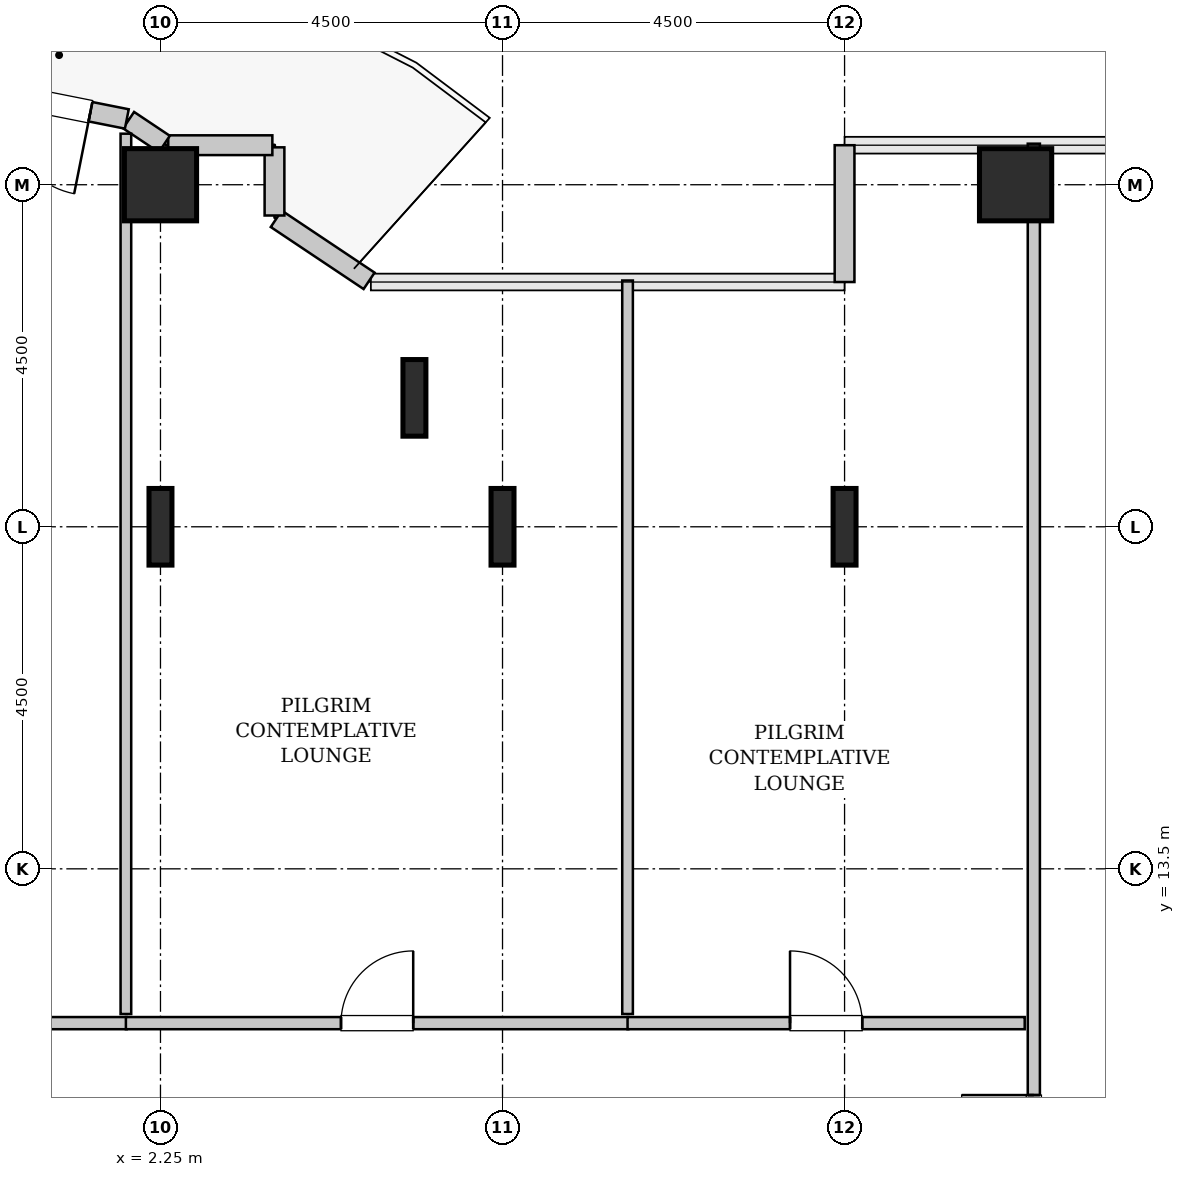
"""IFC4 building model, lengths in metres.
Left out: names, types, materials, properties, quantities, classifications, styles, units other than length and angle.
Written with IfcOpenShell. Run it as: python <this file> out.ifc"""

import sys

from ifc_helpers import new_model, si_unit, direction, frame, frame_2d, origin, origin_2d, place, context, subcontext, project, spatial, rectangle, hollow_rectangle, i_section, extrude, source, transform, mapped, element, fill, save


model = new_model("IFC4")
c1 = context("Model", 3, precision=1e-05, world=origin(), true_north=direction((0.0, 1.0)))
c2 = subcontext(c1, "Body", "Model", "MODEL_VIEW")
j1 = project(units=[si_unit("LENGTHUNIT", "METRE"), si_unit("PLANEANGLEUNIT", "RADIAN")], contexts=[c1])
p1 = place(None, origin())
s1 = spatial("IfcSite", under=j1, at=p1, CompositionType="ELEMENT")
p2 = place(p1, origin())
s2 = spatial("IfcBuilding", under=s1, at=p2, CompositionType="ELEMENT")
p3 = place(p2, frame((0.0, 0.0, 67.2)))
s3 = spatial("IfcBuildingStorey", under=s2, at=p3, CompositionType="ELEMENT", Elevation=67.2)
m1 = source(origin(), c2, "Body", "SweptSolid", [
    extrude(i_section(OverallWidth=0.302, OverallDepth=1.008, WebThickness=0.021, FlangeThickness=0.04, FilletRadius=0.03, at=origin_2d()), origin(), (0.0, 0.0, 1.0), 3.8),
])
p4 = place(p3, frame((2.25, 18.0, 0.0), z_axis=(0.0, 0.0, 1.0), x_axis=(1.0, 0.0, 0.0)))
e1 = element("IfcColumn", 1, at=p4, inside=s3, PredefinedType="COLUMN", context=c2, shape_type="MappedRepresentation", body=[
    mapped(m1, transform((0.0, 0.0, 0.0), x_axis=(1.0, 0.0, 0.0), y_axis=(0.0, 1.0, 0.0), z_axis=(0.0, 0.0, 1.0), scale=1.0)),
])
m2 = source(origin(), c2, "Body", "SweptSolid", [
    extrude(hollow_rectangle(XDim=0.95, YDim=0.95, WallThickness=0.045, InnerFilletRadius=0.045, OuterFilletRadius=0.09, at=origin_2d()), origin(), (0.0, 0.0, 1.0), 3.8),
])
p5 = place(p3, frame((2.25, 22.5, 0.0), z_axis=(0.0, 0.0, 1.0), x_axis=(1.0, 0.0, 0.0)))
e2 = element("IfcColumn", 2, at=p5, inside=s3, PredefinedType="COLUMN", context=c2, shape_type="MappedRepresentation", body=[
    mapped(m2, transform((0.0, 0.0, 0.0), x_axis=(1.0, 0.0, 0.0), y_axis=(0.0, 1.0, 0.0), z_axis=(0.0, 0.0, 1.0), scale=1.0)),
])
for number, where, z_axis, x_axis in (
    (3, (5.591, 19.696, 0.0), (0.0, 0.0, 1.0), (1.0, 0.0, 0.0)),
    (4, (6.75, 18.0, 0.0), (0.0, 0.0, 1.0), (1.0, 0.0, 0.0)),
    (5, (11.25, 18.0, 0.0), (0.0, 0.0, 1.0), (1.0, 0.0, 0.0)),
):
    element("IfcColumn", number, at=place(p3, frame(where, z_axis=z_axis, x_axis=x_axis)), inside=s3, PredefinedType="COLUMN", context=c2, shape_type="MappedRepresentation", body=[
        mapped(m1, transform((0.0, 0.0, 0.0), x_axis=(1.0, 0.0, 0.0), y_axis=(0.0, 1.0, 0.0), z_axis=(0.0, 0.0, 1.0), scale=1.0)),
    ])
p6 = place(p3, frame((13.5, 22.5, 0.0), z_axis=(0.0, 0.0, 1.0), x_axis=(1.0, 0.0, 0.0)))
e6 = element("IfcColumn", 6, at=p6, inside=s3, PredefinedType="COLUMN", context=c2, shape_type="MappedRepresentation", body=[
    mapped(m2, transform((0.0, 0.0, 0.0), x_axis=(1.0, 0.0, 0.0), y_axis=(0.0, 1.0, 0.0), z_axis=(0.0, 0.0, 1.0), scale=1.0)),
])
m3 = source(origin(), c2, "Body", "SweptSolid", [
    extrude(rectangle(XDim=1.8, YDim=0.26, at=frame_2d((0.9, 0.0))), origin(), (0.0, 0.0, 1.0), 3.55),
])
p7 = place(p3, frame((11.25, 23.02, 0.0), z_axis=(0.0, 0.0, 1.0), x_axis=(0.0, -1.0, 0.0)))
e7 = element("IfcWall", 7, at=p7, inside=s3, PredefinedType="SOLIDWALL", context=c2, shape_type="MappedRepresentation", body=[
    mapped(m3, transform((0.0, 0.0, 0.0), x_axis=(1.0, 0.0, 0.0), y_axis=(0.0, 1.0, 0.0), z_axis=(0.0, 0.0, 1.0), scale=1.0)),
])
m4 = source(origin(), c2, "Body", "SweptSolid", [
    extrude(rectangle(XDim=1.469, YDim=0.26, at=frame_2d((0.734, 0.0))), origin(), (0.0, 0.0, 1.0), 3.55),
])
p8 = place(p3, frame((4.995, 21.236, 0.0), z_axis=(0.0, 0.0, 1.0), x_axis=(-0.831461760506, 0.555581983884, 0.0)))
e8 = element("IfcWall", 8, at=p8, inside=s3, PredefinedType="SOLIDWALL", context=c2, shape_type="MappedRepresentation", body=[
    mapped(m4, transform((0.0, 0.0, 0.0), x_axis=(1.0, 0.0, 0.0), y_axis=(0.0, 1.0, 0.0), z_axis=(0.0, 0.0, 1.0), scale=1.0)),
])
m5 = source(origin(), c2, "Body", "SweptSolid", [
    extrude(rectangle(XDim=0.897, YDim=0.26, at=frame_2d((0.448, 0.0))), origin(), (0.0, 0.0, 1.0), 3.55),
])
p9 = place(p3, frame((3.75, 22.095, 0.0), z_axis=(0.0, 0.0, 1.0), x_axis=(0.0, 1.0, 0.0)))
e9 = element("IfcWall", 9, at=p9, inside=s3, PredefinedType="SOLIDWALL", context=c2, shape_type="MappedRepresentation", body=[
    mapped(m5, transform((0.0, 0.0, 0.0), x_axis=(1.0, 0.0, 0.0), y_axis=(0.0, 1.0, 0.0), z_axis=(0.0, 0.0, 1.0), scale=1.0)),
])
m6 = source(origin(), c2, "Body", "SweptSolid", [
    extrude(rectangle(XDim=1.37, YDim=0.26, at=frame_2d((0.685, 0.0))), origin(), (0.0, 0.0, 1.0), 3.55),
])
p10 = place(p3, frame((3.722, 23.02, 0.0), z_axis=(0.0, 0.0, 1.0), x_axis=(-1.0, 0.0, 0.0)))
e10 = element("IfcWall", 10, at=p10, inside=s3, PredefinedType="SOLIDWALL", context=c2, shape_type="MappedRepresentation", body=[
    mapped(m6, transform((0.0, 0.0, 0.0), x_axis=(1.0, 0.0, 0.0), y_axis=(0.0, 1.0, 0.0), z_axis=(0.0, 0.0, 1.0), scale=1.0)),
])
m7 = source(origin(), c2, "Body", "SweptSolid", [
    extrude(rectangle(XDim=0.565, YDim=0.26, at=frame_2d((0.283, 0.0))), origin(), (0.0, 0.0, 1.0), 3.55),
])
p11 = place(p3, frame((2.301, 23.036, 0.0), z_axis=(0.0, 0.0, 1.0), x_axis=(-0.831651492666, 0.555297933317, 0.0)))
e11 = element("IfcWall", 11, at=p11, inside=s3, PredefinedType="SOLIDWALL", context=c2, shape_type="MappedRepresentation", body=[
    mapped(m7, transform((0.0, 0.0, 0.0), x_axis=(1.0, 0.0, 0.0), y_axis=(0.0, 1.0, 0.0), z_axis=(0.0, 0.0, 1.0), scale=1.0)),
])
m8 = source(origin(), c2, "Body", "SweptSolid", [
    extrude(rectangle(XDim=4.137, YDim=0.26, at=frame_2d((2.068, 0.0))), origin(), (0.0, 0.0, 1.0), 3.55),
])
p12 = place(p3, frame((1.807, 23.365, 0.0), z_axis=(0.0, 0.0, 1.0), x_axis=(-0.980782170794, 0.195105954428, 0.0)))
e12 = element("IfcWall", 12, at=p12, inside=s3, PredefinedType="SOLIDWALL", context=c2, shape_type="MappedRepresentation", body=[
    mapped(m8, transform((0.0, 0.0, 0.0), x_axis=(1.0, 0.0, 0.0), y_axis=(0.0, 1.0, 0.0), z_axis=(0.0, 0.0, 1.0), scale=1.0)),
])
p13 = place(p12, frame((0.488, 0.0, 0.0)))
e13 = element("IfcOpeningElement", 13, at=p13, cuts=e12, PredefinedType="OPENING", context=c2, shape_type="SweptSolid", body=[
    extrude(rectangle(XDim=1.1, YDim=2.2, at=frame_2d((0.55, 1.1))), frame((0.0, 0.14, 0.0), z_axis=(0.0, -1.0, 0.0), x_axis=(1.0, 0.0, 0.0)), (0.0, 0.0, 1.0), 0.28),
])
m9 = source(origin(), c2, "Body", "SweptSolid", [
    extrude(rectangle(XDim=14.453, YDim=0.16, at=frame_2d((7.226, 0.0))), origin(), (0.0, 0.0, 1.0), 3.535),
])
p14 = place(p3, frame((13.74, 8.587, 0.0), z_axis=(0.0, 0.0, 1.0), x_axis=(0.0, 1.0, 0.0)))
e14 = element("IfcWall", 14, at=p14, inside=s3, PredefinedType="PARTITIONING", context=c2, shape_type="MappedRepresentation", body=[
    mapped(m9, transform((0.0, 0.0, 0.0), x_axis=(1.0, 0.0, 0.0), y_axis=(0.0, 1.0, 0.0), z_axis=(0.0, 0.0, 1.0), scale=1.0)),
])
p15 = place(p14, frame((0.986, 0.0, 0.0)))
e15 = element("IfcOpeningElement", 15, at=p15, cuts=e14, PredefinedType="OPENING", context=c2, shape_type="SweptSolid", body=[
    extrude(rectangle(XDim=0.95, YDim=2.1, at=frame_2d((0.475, 1.05))), frame((0.0, 0.09, 0.0), z_axis=(0.0, -1.0, 0.0), x_axis=(1.0, 0.0, 0.0)), (0.0, 0.0, 1.0), 0.18),
])
m10 = source(origin(), c2, "Body", "SweptSolid", [
    extrude(rectangle(XDim=4.605, YDim=0.16, at=frame_2d((2.302, 0.0))), origin(), (0.0, 0.0, 1.0), 3.535),
])
p16 = place(p3, frame((-2.8, 11.47, 0.0), z_axis=(0.0, 0.0, 1.0), x_axis=(1.0, 0.0, 0.0)))
e16 = element("IfcWall", 16, at=p16, inside=s3, PredefinedType="PARTITIONING", context=c2, shape_type="MappedRepresentation", body=[
    mapped(m10, transform((0.0, 0.0, 0.0), x_axis=(1.0, 0.0, 0.0), y_axis=(0.0, 1.0, 0.0), z_axis=(0.0, 0.0, 1.0), scale=1.0)),
])
p17 = place(p16, frame((1.827, 0.0, 0.0)))
e17 = element("IfcOpeningElement", 17, at=p17, cuts=e16, PredefinedType="OPENING", context=c2, shape_type="SweptSolid", body=[
    extrude(rectangle(XDim=0.95, YDim=2.1, at=frame_2d((0.475, 1.05))), frame((0.0, 0.09, 0.0), z_axis=(0.0, -1.0, 0.0), x_axis=(1.0, 0.0, 0.0)), (0.0, 0.0, 1.0), 0.18),
])
m11 = source(origin(), c2, "Body", "SweptSolid", [
    extrude(rectangle(XDim=11.581, YDim=0.14, at=frame_2d((5.791, 0.0))), origin(), (0.0, 0.0, 1.0), 2.825),
])
p18 = place(p3, frame((1.795, 11.59, 0.0), z_axis=(0.0, 0.0, 1.0), x_axis=(0.0, 1.0, 0.0)))
e18 = element("IfcWall", 18, at=p18, inside=s3, PredefinedType="PARTITIONING", context=c2, shape_type="MappedRepresentation", body=[
    mapped(m11, transform((0.0, 0.0, 0.0), x_axis=(1.0, 0.0, 0.0), y_axis=(0.0, 1.0, 0.0), z_axis=(0.0, 0.0, 1.0), scale=1.0)),
])
m12 = source(origin(), c2, "Body", "SweptSolid", [
    extrude(rectangle(XDim=6.61, YDim=0.16, at=frame_2d((3.305, 0.0))), origin(), (0.0, 0.0, 1.0), 3.535),
])
p19 = place(p3, frame((1.795, 11.47, 0.0), z_axis=(0.0, 0.0, 1.0), x_axis=(1.0, 0.0, 0.0)))
e19 = element("IfcWall", 19, at=p19, inside=s3, PredefinedType="PARTITIONING", context=c2, shape_type="MappedRepresentation", body=[
    mapped(m12, transform((0.0, 0.0, 0.0), x_axis=(1.0, 0.0, 0.0), y_axis=(0.0, 1.0, 0.0), z_axis=(0.0, 0.0, 1.0), scale=1.0)),
])
p20 = place(p19, frame((2.83, 0.0, 0.0)))
e20 = element("IfcOpeningElement", 20, at=p20, cuts=e19, PredefinedType="OPENING", context=c2, shape_type="SweptSolid", body=[
    extrude(rectangle(XDim=0.95, YDim=2.1, at=frame_2d((0.475, 1.05))), frame((0.0, 0.09, 0.0), z_axis=(0.0, -1.0, 0.0), x_axis=(1.0, 0.0, 0.0)), (0.0, 0.0, 1.0), 0.18),
])
m13 = source(origin(), c2, "Body", "SweptSolid", [
    extrude(rectangle(XDim=9.65, YDim=0.14, at=frame_2d((4.825, 0.0))), origin(), (0.0, 0.0, 1.0), 3.535),
])
p21 = place(p3, frame((8.395, 11.59, 0.0), z_axis=(0.0, 0.0, 1.0), x_axis=(0.0, 1.0, 0.0)))
e21 = element("IfcWall", 21, at=p21, inside=s3, PredefinedType="PARTITIONING", context=c2, shape_type="MappedRepresentation", body=[
    mapped(m13, transform((0.0, 0.0, 0.0), x_axis=(1.0, 0.0, 0.0), y_axis=(0.0, 1.0, 0.0), z_axis=(0.0, 0.0, 1.0), scale=1.0)),
])
m14 = source(origin(), c2, "Body", "SweptSolid", [
    extrude(rectangle(XDim=5.225, YDim=0.16, at=frame_2d((2.613, 0.0))), origin(), (0.0, 0.0, 1.0), 3.535),
])
p22 = place(p3, frame((8.395, 11.47, 0.0), z_axis=(0.0, 0.0, 1.0), x_axis=(1.0, 0.0, 0.0)))
e22 = element("IfcWall", 22, at=p22, inside=s3, PredefinedType="PARTITIONING", context=c2, shape_type="MappedRepresentation", body=[
    mapped(m14, transform((0.0, 0.0, 0.0), x_axis=(1.0, 0.0, 0.0), y_axis=(0.0, 1.0, 0.0), z_axis=(0.0, 0.0, 1.0), scale=1.0)),
])
p23 = place(p22, frame((2.137, 0.0, 0.0)))
e23 = element("IfcOpeningElement", 23, at=p23, cuts=e22, PredefinedType="OPENING", context=c2, shape_type="SweptSolid", body=[
    extrude(rectangle(XDim=0.95, YDim=2.1, at=frame_2d((0.475, 1.05))), frame((0.0, 0.09, 0.0), z_axis=(0.0, -1.0, 0.0), x_axis=(1.0, 0.0, 0.0)), (0.0, 0.0, 1.0), 0.18),
])
m15 = source(origin(), c2, "Body", "SweptSolid", [
    extrude(rectangle(XDim=1.1, YDim=2.2, at=frame_2d((0.55, 1.1))), frame((0.0, 0.025, 0.0), z_axis=(0.0, -1.0, 0.0), x_axis=(1.0, 0.0, 0.0)), (0.0, 0.0, 1.0), 0.05),
])
p24 = place(p13, origin())
e24 = element("IfcDoor", 24, at=p24, inside=s3, OperationType="SINGLE_SWING_LEFT", PredefinedType="DOOR", context=c2, shape_type="MappedRepresentation", body=[
    mapped(m15, transform((0.0, 0.0, 0.0), x_axis=(1.0, 0.0, 0.0), y_axis=(0.0, 1.0, 0.0), z_axis=(0.0, 0.0, 1.0), scale=1.0)),
])
fill(e13, e24)
m16 = source(origin(), c2, "Body", "SweptSolid", [
    extrude(rectangle(XDim=0.95, YDim=2.1, at=frame_2d((0.475, 1.05))), frame((0.0, 0.025, 0.0), z_axis=(0.0, -1.0, 0.0), x_axis=(1.0, 0.0, 0.0)), (0.0, 0.0, 1.0), 0.05),
])
p25 = place(p15, origin())
e25 = element("IfcDoor", 25, at=p25, inside=s3, OperationType="SINGLE_SWING_RIGHT", PredefinedType="DOOR", context=c2, shape_type="MappedRepresentation", body=[
    mapped(m16, transform((0.0, 0.0, 0.0), x_axis=(1.0, 0.0, 0.0), y_axis=(0.0, 1.0, 0.0), z_axis=(0.0, 0.0, 1.0), scale=1.0)),
])
fill(e15, e25)
p26 = place(p20, origin())
e26 = element("IfcDoor", 26, at=p26, inside=s3, OperationType="SINGLE_SWING_RIGHT", PredefinedType="DOOR", context=c2, shape_type="MappedRepresentation", body=[
    mapped(m16, transform((0.0, 0.0, 0.0), x_axis=(1.0, 0.0, 0.0), y_axis=(0.0, 1.0, 0.0), z_axis=(0.0, 0.0, 1.0), scale=1.0)),
])
fill(e20, e26)
p27 = place(p23, origin())
e27 = element("IfcDoor", 27, at=p27, inside=s3, OperationType="SINGLE_SWING_LEFT", PredefinedType="DOOR", context=c2, shape_type="MappedRepresentation", body=[
    mapped(m16, transform((0.0, 0.0, 0.0), x_axis=(1.0, 0.0, 0.0), y_axis=(0.0, 1.0, 0.0), z_axis=(0.0, 0.0, 1.0), scale=1.0)),
])
fill(e23, e27)
save(model, sys.argv[1])
